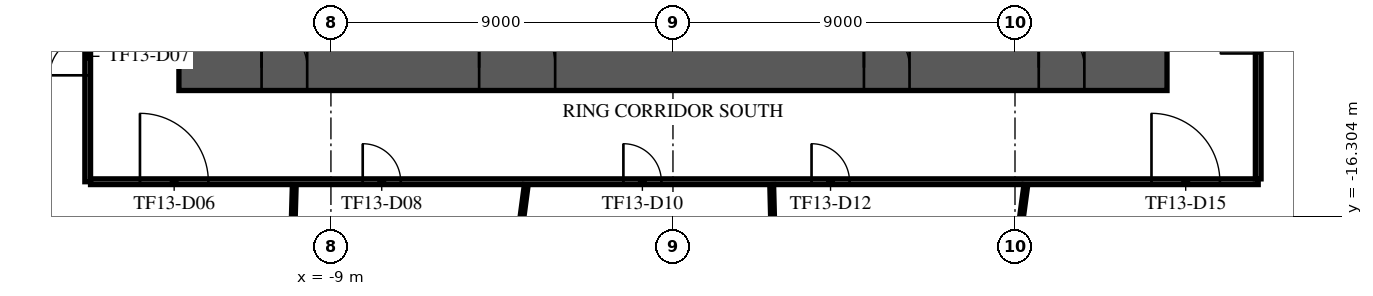
"""IFC4 building model, lengths in metres.
Left out: names, types, materials, properties, quantities, classifications, styles, units other than length and angle.
Written with IfcOpenShell. Run it as: python <this file> out.ifc"""

import sys

from ifc_helpers import new_model, si_unit, direction, frame, frame_2d, origin, place, context, subcontext, project, spatial, rectangle, extrude, element, fill, save


model = new_model("IFC4")
c1 = context("Model", 3, precision=1e-05, world=origin(), true_north=direction((0.0, 1.0)))
c2 = subcontext(c1, "Body", "Model", "MODEL_VIEW")
j1 = project(units=[si_unit("LENGTHUNIT", "METRE"), si_unit("PLANEANGLEUNIT", "RADIAN")], contexts=[c1])
p1 = place(None, origin())
s1 = spatial("IfcSite", under=j1, at=p1, CompositionType="ELEMENT")
p2 = place(p1, origin())
s2 = spatial("IfcBuilding", under=s1, at=p2, CompositionType="ELEMENT")
p3 = place(p2, frame((0.0, 0.0, 59.7)))
s3 = spatial("IfcBuildingStorey", under=s2, at=p3, CompositionType="ELEMENT", Elevation=59.7)
p4 = place(p3, frame((-13.0, -12.4, 0.0), z_axis=(0.0, 0.0, 1.0), x_axis=(1.0, 0.0, 0.0)))
e1 = element("IfcWall", 1, at=p4, inside=s3, PredefinedType="SHEAR", context=c2, shape_type="SweptSolid", body=[
    extrude(rectangle(XDim=26.0, YDim=1.2, at=frame_2d((13.0, 0.0))), origin(), (0.0, 0.0, 1.0), 3.75),
])
p5 = place(p4, frame((7.9, 0.0, 0.0)))
e2 = element("IfcOpeningElement", 2, at=p5, cuts=e1, PredefinedType="OPENING", context=c2, shape_type="SweptSolid", body=[
    extrude(rectangle(XDim=2.0, YDim=2.1, at=frame_2d((1.0, 1.05))), frame((0.0, 0.61, 0.0), z_axis=(0.0, -1.0, 0.0), x_axis=(1.0, 0.0, 0.0)), (0.0, 0.0, 1.0), 1.22),
])
p6 = place(p4, frame((18.025, 0.0, 0.0)))
e3 = element("IfcOpeningElement", 3, at=p6, cuts=e1, PredefinedType="OPENING", context=c2, shape_type="SweptSolid", body=[
    extrude(rectangle(XDim=1.2, YDim=2.1, at=frame_2d((0.6, 1.05))), frame((0.0, 0.61, 0.0), z_axis=(0.0, -1.0, 0.0), x_axis=(1.0, 0.0, 0.0)), (0.0, 0.0, 1.0), 1.22),
])
p7 = place(p4, frame((2.175, 0.0, 0.0)))
e4 = element("IfcOpeningElement", 4, at=p7, cuts=e1, PredefinedType="OPENING", context=c2, shape_type="SweptSolid", body=[
    extrude(rectangle(XDim=1.2, YDim=2.1, at=frame_2d((0.6, 1.05))), frame((0.0, 0.61, 0.0), z_axis=(0.0, -1.0, 0.0), x_axis=(1.0, 0.0, 0.0)), (0.0, 0.0, 1.0), 1.22),
])
p8 = place(p4, frame((22.625, 0.0, 0.0)))
e5 = element("IfcOpeningElement", 5, at=p8, cuts=e1, PredefinedType="OPENING", context=c2, shape_type="SweptSolid", body=[
    extrude(rectangle(XDim=1.2, YDim=2.1, at=frame_2d((0.6, 1.05))), frame((0.0, 0.61, 0.0), z_axis=(0.0, -1.0, 0.0), x_axis=(1.0, 0.0, 0.0)), (0.0, 0.0, 1.0), 1.22),
])
p9 = place(p3, frame((-15.4, -15.4, 0.0), z_axis=(0.0, 0.0, 1.0), x_axis=(0.0, 1.0, 0.0)))
e6 = element("IfcWall", 6, at=p9, inside=s3, PredefinedType="PARTITIONING", context=c2, shape_type="SweptSolid", body=[
    extrude(rectangle(XDim=30.8, YDim=0.15, at=frame_2d((15.4, 0.0))), origin(), (0.0, 0.0, 1.0), 3.25),
])
p10 = place(p9, frame((21.408, 0.0, 0.0)))
e7 = element("IfcOpeningElement", 7, at=p10, cuts=e6, PredefinedType="OPENING", context=c2, shape_type="SweptSolid", body=[
    extrude(rectangle(XDim=1.8, YDim=2.1, at=frame_2d((0.9, 1.05))), frame((0.0, 0.085, 0.0), z_axis=(0.0, -1.0, 0.0), x_axis=(1.0, 0.0, 0.0)), (0.0, 0.0, 1.0), 0.17),
])
p11 = place(p9, frame((17.158, 0.0, 0.0)))
e8 = element("IfcOpeningElement", 8, at=p11, cuts=e6, PredefinedType="OPENING", context=c2, shape_type="SweptSolid", body=[
    extrude(rectangle(XDim=1.0, YDim=2.1, at=frame_2d((0.5, 1.05))), frame((0.0, 0.085, 0.0), z_axis=(0.0, -1.0, 0.0), x_axis=(1.0, 0.0, 0.0)), (0.0, 0.0, 1.0), 0.17),
])
p12 = place(p9, frame((8.316, 0.0, 0.0)))
e9 = element("IfcOpeningElement", 9, at=p12, cuts=e6, PredefinedType="OPENING", context=c2, shape_type="SweptSolid", body=[
    extrude(rectangle(XDim=1.0, YDim=2.1, at=frame_2d((0.5, 1.05))), frame((0.0, 0.085, 0.0), z_axis=(0.0, -1.0, 0.0), x_axis=(1.0, 0.0, 0.0)), (0.0, 0.0, 1.0), 0.17),
])
p13 = place(p9, frame((28.516, 0.0, 0.0)))
e10 = element("IfcOpeningElement", 10, at=p13, cuts=e6, PredefinedType="OPENING", context=c2, shape_type="SweptSolid", body=[
    extrude(rectangle(XDim=1.8, YDim=2.1, at=frame_2d((0.9, 1.05))), frame((0.0, 0.085, 0.0), z_axis=(0.0, -1.0, 0.0), x_axis=(1.0, 0.0, 0.0)), (0.0, 0.0, 1.0), 0.17),
])
p14 = place(p9, frame((2.8, 0.0, 0.0)))
e11 = element("IfcOpeningElement", 11, at=p14, cuts=e6, PredefinedType="OPENING", context=c2, shape_type="SweptSolid", body=[
    extrude(rectangle(XDim=1.0, YDim=2.1, at=frame_2d((0.5, 1.05))), frame((0.0, 0.085, 0.0), z_axis=(0.0, -1.0, 0.0), x_axis=(1.0, 0.0, 0.0)), (0.0, 0.0, 1.0), 0.17),
])
p15 = place(p3, frame((-15.325, -15.4, 0.0), z_axis=(0.0, 0.0, 1.0), x_axis=(1.0, 0.0, 0.0)))
e12 = element("IfcWall", 12, at=p15, inside=s3, PredefinedType="PARTITIONING", context=c2, shape_type="SweptSolid", body=[
    extrude(rectangle(XDim=30.725, YDim=0.15, at=frame_2d((15.362, 0.0))), origin(), (0.0, 0.0, 1.0), 3.25),
])
p16 = place(p15, frame((1.3, 0.0, 0.0)))
e13 = element("IfcOpeningElement", 13, at=p16, cuts=e12, PredefinedType="OPENING", context=c2, shape_type="SweptSolid", body=[
    extrude(rectangle(XDim=1.8, YDim=2.1, at=frame_2d((0.9, 1.05))), frame((0.0, 0.085, 0.0), z_axis=(0.0, -1.0, 0.0), x_axis=(1.0, 0.0, 0.0)), (0.0, 0.0, 1.0), 0.17),
])
p17 = place(p15, frame((7.161, 0.0, 0.0)))
e14 = element("IfcOpeningElement", 14, at=p17, cuts=e12, PredefinedType="OPENING", context=c2, shape_type="SweptSolid", body=[
    extrude(rectangle(XDim=1.0, YDim=2.1, at=frame_2d((0.5, 1.05))), frame((0.0, 0.085, 0.0), z_axis=(0.0, -1.0, 0.0), x_axis=(1.0, 0.0, 0.0)), (0.0, 0.0, 1.0), 0.17),
])
p18 = place(p15, frame((14.021, 0.0, 0.0)))
e15 = element("IfcOpeningElement", 15, at=p18, cuts=e12, PredefinedType="OPENING", context=c2, shape_type="SweptSolid", body=[
    extrude(rectangle(XDim=1.0, YDim=2.1, at=frame_2d((0.5, 1.05))), frame((0.0, 0.085, 0.0), z_axis=(0.0, -1.0, 0.0), x_axis=(1.0, 0.0, 0.0)), (0.0, 0.0, 1.0), 0.17),
])
p19 = place(p15, frame((18.971, 0.0, 0.0)))
e16 = element("IfcOpeningElement", 16, at=p19, cuts=e12, PredefinedType="OPENING", context=c2, shape_type="SweptSolid", body=[
    extrude(rectangle(XDim=1.0, YDim=2.1, at=frame_2d((0.5, 1.05))), frame((0.0, 0.085, 0.0), z_axis=(0.0, -1.0, 0.0), x_axis=(1.0, 0.0, 0.0)), (0.0, 0.0, 1.0), 0.17),
])
p20 = place(p15, frame((27.917, 0.0, 0.0)))
e17 = element("IfcOpeningElement", 17, at=p20, cuts=e12, PredefinedType="OPENING", context=c2, shape_type="SweptSolid", body=[
    extrude(rectangle(XDim=1.8, YDim=2.1, at=frame_2d((0.9, 1.05))), frame((0.0, 0.085, 0.0), z_axis=(0.0, -1.0, 0.0), x_axis=(1.0, 0.0, 0.0)), (0.0, 0.0, 1.0), 0.17),
])
p21 = place(p3, frame((15.4, -15.325, 0.0), z_axis=(0.0, 0.0, 1.0), x_axis=(0.0, 1.0, 0.0)))
e18 = element("IfcWall", 18, at=p21, inside=s3, PredefinedType="PARTITIONING", context=c2, shape_type="SweptSolid", body=[
    extrude(rectangle(XDim=30.65, YDim=0.15, at=frame_2d((15.325, 0.0))), origin(), (0.0, 0.0, 1.0), 3.25),
])
p22 = place(p21, frame((27.985, 0.0, 0.0)))
e19 = element("IfcOpeningElement", 19, at=p22, cuts=e18, PredefinedType="OPENING", context=c2, shape_type="SweptSolid", body=[
    extrude(rectangle(XDim=1.0, YDim=2.1, at=frame_2d((0.5, 1.05))), frame((0.0, 0.085, 0.0), z_axis=(0.0, -1.0, 0.0), x_axis=(1.0, 0.0, 0.0)), (0.0, 0.0, 1.0), 0.17),
])
p23 = place(p21, frame((3.3, 0.0, 0.0)))
e20 = element("IfcOpeningElement", 20, at=p23, cuts=e18, PredefinedType="OPENING", context=c2, shape_type="SweptSolid", body=[
    extrude(rectangle(XDim=1.0, YDim=2.1, at=frame_2d((0.5, 1.05))), frame((0.0, 0.085, 0.0), z_axis=(0.0, -1.0, 0.0), x_axis=(1.0, 0.0, 0.0)), (0.0, 0.0, 1.0), 0.17),
])
p24 = place(p21, frame((16.538, 0.0, 0.0)))
e21 = element("IfcOpeningElement", 21, at=p24, cuts=e18, PredefinedType="OPENING", context=c2, shape_type="SweptSolid", body=[
    extrude(rectangle(XDim=1.0, YDim=2.1, at=frame_2d((0.5, 1.05))), frame((0.0, 0.085, 0.0), z_axis=(0.0, -1.0, 0.0), x_axis=(1.0, 0.0, 0.0)), (0.0, 0.0, 1.0), 0.17),
])
p25 = place(p21, frame((8.087, 0.0, 0.0)))
e22 = element("IfcOpeningElement", 22, at=p25, cuts=e18, PredefinedType="OPENING", context=c2, shape_type="SweptSolid", body=[
    extrude(rectangle(XDim=1.0, YDim=2.1, at=frame_2d((0.5, 1.05))), frame((0.0, 0.085, 0.0), z_axis=(0.0, -1.0, 0.0), x_axis=(1.0, 0.0, 0.0)), (0.0, 0.0, 1.0), 0.17),
])
p26 = place(p3, frame((-10.346, -28.491, 0.0), z_axis=(0.0, 0.0, 1.0), x_axis=(0.029345051756, 0.999569341235, 0.0)))
e23 = element("IfcWall", 23, at=p26, inside=s3, PredefinedType="PARTITIONING", context=c2, shape_type="SweptSolid", body=[
    extrude(rectangle(XDim=13.02, YDim=0.1, at=frame_2d((6.51, 0.0))), origin(), (0.0, 0.0, 1.0), 3.25),
])
p27 = place(p3, frame((-5.899, -30.892, 0.0), z_axis=(0.0, 0.0, 1.0), x_axis=(0.131193510247, 0.991356778798, 0.0)))
e24 = element("IfcWall", 24, at=p27, inside=s3, PredefinedType="PARTITIONING", context=c2, shape_type="SweptSolid", body=[
    extrude(rectangle(XDim=15.544, YDim=0.1, at=frame_2d((7.772, 0.0))), origin(), (0.0, 0.0, 1.0), 2.95),
])
p28 = place(p3, frame((2.598, -15.476, 0.0), z_axis=(0.0, 0.0, 1.0), x_axis=(0.025790593623, -0.999667367318, 0.0)))
e25 = element("IfcWall", 25, at=p28, inside=s3, PredefinedType="PARTITIONING", context=c2, shape_type="SweptSolid", body=[
    extrude(rectangle(XDim=13.859, YDim=0.1, at=frame_2d((6.929, 0.0))), origin(), (0.0, 0.0, 1.0), 2.95),
])
p29 = place(p3, frame((7.531, -28.524, 0.0), z_axis=(0.0, 0.0, 1.0), x_axis=(0.133336319453, 0.99107084808, 0.0)))
e26 = element("IfcWall", 26, at=p29, inside=s3, PredefinedType="PARTITIONING", context=c2, shape_type="SweptSolid", body=[
    extrude(rectangle(XDim=13.159, YDim=0.1, at=frame_2d((6.58, 0.0))), origin(), (0.0, 0.0, 1.0), 2.95),
])
p30 = place(p5, origin())
e27 = element("IfcDoor", 27, at=p30, inside=s3, OperationType="SINGLE_SWING_LEFT", PredefinedType="DOOR", context=c2, shape_type="SweptSolid", body=[
    extrude(rectangle(XDim=2.0, YDim=2.1, at=frame_2d((1.0, 1.05))), frame((0.0, 0.025, 0.0), z_axis=(0.0, -1.0, 0.0), x_axis=(1.0, 0.0, 0.0)), (0.0, 0.0, 1.0), 0.05),
])
fill(e2, e27)
p31 = place(p6, origin())
e28 = element("IfcDoor", 28, at=p31, inside=s3, OperationType="SINGLE_SWING_LEFT", PredefinedType="DOOR", context=c2, shape_type="SweptSolid", body=[
    extrude(rectangle(XDim=1.2, YDim=2.1, at=frame_2d((0.6, 1.05))), frame((0.0, 0.025, 0.0), z_axis=(0.0, -1.0, 0.0), x_axis=(1.0, 0.0, 0.0)), (0.0, 0.0, 1.0), 0.05),
])
fill(e3, e28)
p32 = place(p7, origin())
e29 = element("IfcDoor", 29, at=p32, inside=s3, OperationType="SINGLE_SWING_LEFT", PredefinedType="DOOR", context=c2, shape_type="SweptSolid", body=[
    extrude(rectangle(XDim=1.2, YDim=2.1, at=frame_2d((0.6, 1.05))), frame((0.0, 0.025, 0.0), z_axis=(0.0, -1.0, 0.0), x_axis=(1.0, 0.0, 0.0)), (0.0, 0.0, 1.0), 0.05),
])
fill(e4, e29)
p33 = place(p8, origin())
e30 = element("IfcDoor", 30, at=p33, inside=s3, OperationType="SINGLE_SWING_LEFT", PredefinedType="DOOR", context=c2, shape_type="SweptSolid", body=[
    extrude(rectangle(XDim=1.2, YDim=2.1, at=frame_2d((0.6, 1.05))), frame((0.0, 0.025, 0.0), z_axis=(0.0, -1.0, 0.0), x_axis=(1.0, 0.0, 0.0)), (0.0, 0.0, 1.0), 0.05),
])
fill(e5, e30)
p34 = place(p16, frame((1.8, 0.0, 0.0), z_axis=(0.0, 0.0, 1.0), x_axis=(-1.0, 0.0, 0.0)))
e31 = element("IfcDoor", 31, at=p34, inside=s3, OperationType="DOUBLE_DOOR_SINGLE_SWING", PredefinedType="DOOR", context=c2, shape_type="SweptSolid", body=[
    extrude(rectangle(XDim=1.8, YDim=2.1, at=frame_2d((0.9, 1.05))), frame((0.0, 0.025, 0.0), z_axis=(0.0, -1.0, 0.0), x_axis=(1.0, 0.0, 0.0)), (0.0, 0.0, 1.0), 0.05),
])
fill(e13, e31)
p35 = place(p14, origin())
e32 = element("IfcDoor", 32, at=p35, inside=s3, OperationType="SINGLE_SWING_RIGHT", PredefinedType="DOOR", context=c2, shape_type="SweptSolid", body=[
    extrude(rectangle(XDim=1.0, YDim=2.1, at=frame_2d((0.5, 1.05))), frame((0.0, 0.025, 0.0), z_axis=(0.0, -1.0, 0.0), x_axis=(1.0, 0.0, 0.0)), (0.0, 0.0, 1.0), 0.05),
])
fill(e11, e32)
p36 = place(p17, frame((1.0, 0.0, 0.0), z_axis=(0.0, 0.0, 1.0), x_axis=(-1.0, 0.0, 0.0)))
e33 = element("IfcDoor", 33, at=p36, inside=s3, OperationType="SINGLE_SWING_LEFT", PredefinedType="DOOR", context=c2, shape_type="SweptSolid", body=[
    extrude(rectangle(XDim=1.0, YDim=2.1, at=frame_2d((0.5, 1.05))), frame((0.0, 0.025, 0.0), z_axis=(0.0, -1.0, 0.0), x_axis=(1.0, 0.0, 0.0)), (0.0, 0.0, 1.0), 0.05),
])
fill(e14, e33)
p37 = place(p18, frame((1.0, 0.0, 0.0), z_axis=(0.0, 0.0, 1.0), x_axis=(-1.0, 0.0, 0.0)))
e34 = element("IfcDoor", 34, at=p37, inside=s3, OperationType="SINGLE_SWING_RIGHT", PredefinedType="DOOR", context=c2, shape_type="SweptSolid", body=[
    extrude(rectangle(XDim=1.0, YDim=2.1, at=frame_2d((0.5, 1.05))), frame((0.0, 0.025, 0.0), z_axis=(0.0, -1.0, 0.0), x_axis=(1.0, 0.0, 0.0)), (0.0, 0.0, 1.0), 0.05),
])
fill(e15, e34)
p38 = place(p19, frame((1.0, 0.0, 0.0), z_axis=(0.0, 0.0, 1.0), x_axis=(-1.0, 0.0, 0.0)))
e35 = element("IfcDoor", 35, at=p38, inside=s3, OperationType="SINGLE_SWING_RIGHT", PredefinedType="DOOR", context=c2, shape_type="SweptSolid", body=[
    extrude(rectangle(XDim=1.0, YDim=2.1, at=frame_2d((0.5, 1.05))), frame((0.0, 0.025, 0.0), z_axis=(0.0, -1.0, 0.0), x_axis=(1.0, 0.0, 0.0)), (0.0, 0.0, 1.0), 0.05),
])
fill(e16, e35)
p39 = place(p20, frame((1.8, 0.0, 0.0), z_axis=(0.0, 0.0, 1.0), x_axis=(-1.0, 0.0, 0.0)))
e36 = element("IfcDoor", 36, at=p39, inside=s3, OperationType="DOUBLE_DOOR_SINGLE_SWING", PredefinedType="DOOR", context=c2, shape_type="SweptSolid", body=[
    extrude(rectangle(XDim=1.8, YDim=2.1, at=frame_2d((0.9, 1.05))), frame((0.0, 0.025, 0.0), z_axis=(0.0, -1.0, 0.0), x_axis=(1.0, 0.0, 0.0)), (0.0, 0.0, 1.0), 0.05),
])
fill(e17, e36)
p40 = place(p23, frame((1.0, 0.0, 0.0), z_axis=(0.0, 0.0, 1.0), x_axis=(-1.0, 0.0, 0.0)))
e37 = element("IfcDoor", 37, at=p40, inside=s3, OperationType="SINGLE_SWING_RIGHT", PredefinedType="DOOR", context=c2, shape_type="SweptSolid", body=[
    extrude(rectangle(XDim=1.0, YDim=2.1, at=frame_2d((0.5, 1.05))), frame((0.0, 0.025, 0.0), z_axis=(0.0, -1.0, 0.0), x_axis=(1.0, 0.0, 0.0)), (0.0, 0.0, 1.0), 0.05),
])
fill(e20, e37)
save(model, sys.argv[1])
